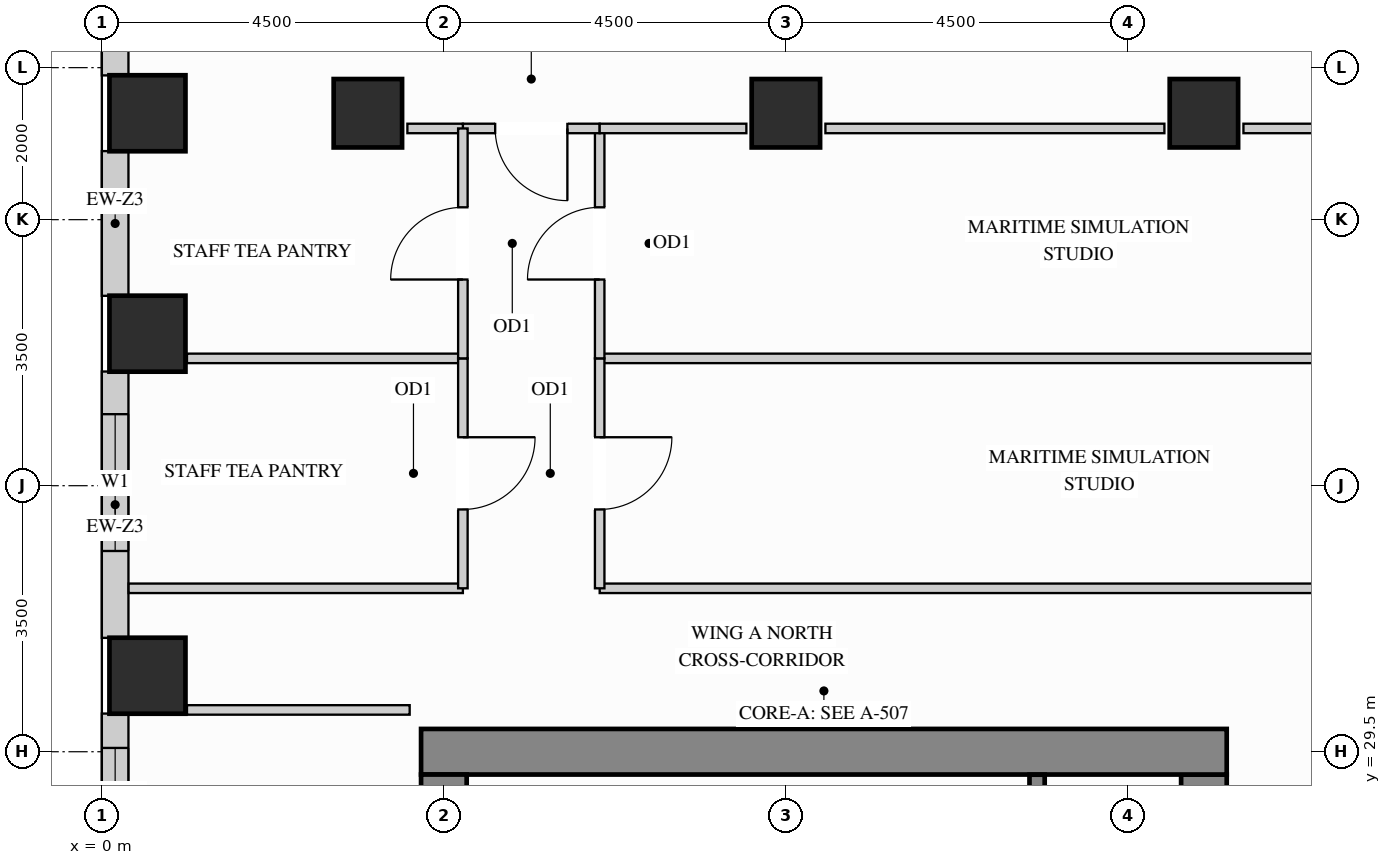
"""IFC4 building model, lengths in metres.
Left out: names, types, materials, properties, quantities, classifications, styles, units other than length and angle.
Written with IfcOpenShell. Run it as: python <this file> out.ifc"""

import sys

from ifc_helpers import new_model, si_unit, direction, frame, frame_2d, origin, origin_2d, place, context, subcontext, project, spatial, rectangle, extrude, source, transform, mapped, element, fill, save


model = new_model("IFC4")
c1 = context("Model", 3, precision=1e-05, world=origin(), true_north=direction((0.0, 1.0)))
c2 = subcontext(c1, "Body", "Model", "MODEL_VIEW")
j1 = project(units=[si_unit("LENGTHUNIT", "METRE"), si_unit("PLANEANGLEUNIT", "RADIAN")], contexts=[c1])
p1 = place(None, origin())
s1 = spatial("IfcSite", under=j1, at=p1, CompositionType="ELEMENT")
p2 = place(p1, origin())
s2 = spatial("IfcBuilding", under=s1, at=p2, CompositionType="ELEMENT")
p3 = place(p2, frame((0.0, 0.0, 143.1)))
s3 = spatial("IfcBuildingStorey", under=s2, at=p3, CompositionType="ELEMENT", Elevation=143.1)
m1 = source(origin(), c2, "Body", "SweptSolid", [
    extrude(rectangle(XDim=0.9, YDim=0.9, at=origin_2d()), origin(), (0.0, 0.0, 1.0), 3.4),
])
for number, where, z_axis, x_axis in (
    (1, (14.5, 37.9, 0.0), (0.0, 0.0, 1.0), (1.0, 0.0, 0.0)),
    (2, (3.5, 37.9, 0.0), (0.0, 0.0, 1.0), (1.0, 0.0, 0.0)),
    (3, (9.0, 37.9, 0.0), (0.0, 0.0, 1.0), (1.0, 0.0, 0.0)),
):
    element("IfcColumn", number, at=place(p3, frame(where, z_axis=z_axis, x_axis=x_axis)), inside=s3, PredefinedType="COLUMN", context=c2, shape_type="MappedRepresentation", body=[
        mapped(m1, transform((0.0, 0.0, 0.0), x_axis=(1.0, 0.0, 0.0), y_axis=(0.0, 1.0, 0.0), z_axis=(0.0, 0.0, 1.0))),
    ])
m2 = source(origin(), c2, "Body", "SweptSolid", [
    extrude(rectangle(XDim=1.0, YDim=1.0, at=origin_2d()), origin(), (0.0, 0.0, 1.0), 3.4),
])
for number, where, z_axis, x_axis in (
    (4, (0.6, 30.5, 0.0), (0.0, 0.0, 1.0), (1.0, 0.0, 0.0)),
    (5, (0.6, 35.0, 0.0), (0.0, 0.0, 1.0), (1.0, 0.0, 0.0)),
    (6, (0.6, 37.9, 0.0), (0.0, 0.0, 1.0), (1.0, 0.0, 0.0)),
):
    element("IfcColumn", number, at=place(p3, frame(where, z_axis=z_axis, x_axis=x_axis)), inside=s3, PredefinedType="COLUMN", context=c2, shape_type="MappedRepresentation", body=[
        mapped(m2, transform((0.0, 0.0, 0.0), x_axis=(1.0, 0.0, 0.0), y_axis=(0.0, 1.0, 0.0), z_axis=(0.0, 0.0, 1.0))),
    ])
m3 = source(origin(), c2, "Body", "SweptSolid", [
    extrude(rectangle(XDim=8.32, YDim=0.6, at=frame_2d((4.16, 0.0))), origin(), (0.0, 0.0, 1.0), 3.4),
])
p4 = place(p3, frame((14.5, 20.88, 0.0), z_axis=(0.0, 0.0, 1.0), x_axis=(0.0, 1.0, 0.0)))
e7 = element("IfcWall", 7, at=p4, inside=s3, PredefinedType="SHEAR", context=c2, shape_type="MappedRepresentation", body=[
    mapped(m3, transform((0.0, 0.0, 0.0), x_axis=(1.0, 0.0, 0.0), y_axis=(0.0, 1.0, 0.0), z_axis=(0.0, 0.0, 1.0))),
])
m4 = source(origin(), c2, "Body", "SweptSolid", [
    extrude(rectangle(XDim=10.6, YDim=0.6, at=frame_2d((5.3, 0.0))), origin(), (0.0, 0.0, 1.0), 3.4),
])
p5 = place(p3, frame((4.2, 29.5, 0.0), z_axis=(0.0, 0.0, 1.0), x_axis=(1.0, 0.0, 0.0)))
e8 = element("IfcWall", 8, at=p5, inside=s3, PredefinedType="SHEAR", context=c2, shape_type="MappedRepresentation", body=[
    mapped(m4, transform((0.0, 0.0, 0.0), x_axis=(1.0, 0.0, 0.0), y_axis=(0.0, 1.0, 0.0), z_axis=(0.0, 0.0, 1.0))),
])
m5 = source(origin(), c2, "Body", "SweptSolid", [
    extrude(rectangle(XDim=20.4, YDim=0.6, at=frame_2d((10.2, 0.0))), origin(), (0.0, 0.0, 1.0), 3.4),
])
p6 = place(p3, frame((4.5, 8.8, 0.0), z_axis=(0.0, 0.0, 1.0), x_axis=(0.0, 1.0, 0.0)))
e9 = element("IfcWall", 9, at=p6, inside=s3, PredefinedType="SHEAR", context=c2, shape_type="MappedRepresentation", body=[
    mapped(m5, transform((0.0, 0.0, 0.0), x_axis=(1.0, 0.0, 0.0), y_axis=(0.0, 1.0, 0.0), z_axis=(0.0, 0.0, 1.0))),
])
m6 = source(origin(), c2, "Body", "SweptSolid", [
    extrude(rectangle(XDim=0.754, YDim=0.35, at=frame_2d((0.377, 0.0))), origin(), (0.0, 0.0, 1.0), 3.385),
])
p7 = place(p3, frame((0.175, 39.152, 0.0), z_axis=(0.0, 0.0, 1.0), x_axis=(0.0, -1.0, 0.0)))
e10 = element("IfcWall", 10, at=p7, inside=s3, PredefinedType="SOLIDWALL", context=c2, shape_type="MappedRepresentation", body=[
    mapped(m6, transform((0.0, 0.0, 0.0), x_axis=(1.0, 0.0, 0.0), y_axis=(0.0, 1.0, 0.0), z_axis=(0.0, 0.0, 1.0))),
])
m7 = source(origin(), c2, "Body", "SweptSolid", [
    extrude(rectangle(XDim=1.904, YDim=0.35, at=frame_2d((0.952, 0.0))), origin(), (0.0, 0.0, 1.0), 2.612),
])
p8 = place(p3, frame((0.175, 37.402, 0.0), z_axis=(0.0, 0.0, 1.0), x_axis=(0.0, -1.0, 0.0)))
e11 = element("IfcWall", 11, at=p8, inside=s3, PredefinedType="SOLIDWALL", context=c2, shape_type="MappedRepresentation", body=[
    mapped(m7, transform((0.0, 0.0, 0.0), x_axis=(1.0, 0.0, 0.0), y_axis=(0.0, 1.0, 0.0), z_axis=(0.0, 0.0, 1.0))),
])
p9 = place(p3, frame((0.175, 34.502, 0.0), z_axis=(0.0, 0.0, 1.0), x_axis=(0.0, -1.0, 0.0)))
e12 = element("IfcWall", 12, at=p9, inside=s3, PredefinedType="SOLIDWALL", context=c2, shape_type="SweptSolid", body=[
    extrude(rectangle(XDim=3.504, YDim=0.35, at=frame_2d((1.752, 0.0))), origin(), (0.0, 0.0, 1.0), 2.612),
])
p10 = place(p9, frame((0.561, 0.0, 0.78)))
e13 = element("IfcOpeningElement", 13, at=p10, cuts=e12, PredefinedType="OPENING", context=c2, shape_type="SweptSolid", body=[
    extrude(rectangle(XDim=1.8, YDim=1.652, at=frame_2d((0.9, 0.826))), frame((0.0, 0.185, 0.0), z_axis=(0.0, -1.0, 0.0), x_axis=(1.0, 0.0, 0.0)), (0.0, 0.0, 1.0), 0.37),
])
p11 = place(p3, frame((0.175, 30.002, 0.0), z_axis=(0.0, 0.0, 1.0), x_axis=(0.0, -1.0, 0.0)))
e14 = element("IfcWall", 14, at=p11, inside=s3, PredefinedType="SOLIDWALL", context=c2, shape_type="SweptSolid", body=[
    extrude(rectangle(XDim=2.704, YDim=0.35, at=frame_2d((1.352, 0.0))), origin(), (0.0, 0.0, 1.0), 2.612),
])
p12 = place(p11, frame((0.452, 0.0, 0.78)))
e15 = element("IfcOpeningElement", 15, at=p12, cuts=e14, PredefinedType="OPENING", context=c2, shape_type="SweptSolid", body=[
    extrude(rectangle(XDim=1.8, YDim=1.652, at=frame_2d((0.9, 0.826))), frame((0.0, 0.185, 0.0), z_axis=(0.0, -1.0, 0.0), x_axis=(1.0, 0.0, 0.0)), (0.0, 0.0, 1.0), 0.37),
])
m8 = source(origin(), c2, "Body", "SweptSolid", [
    extrude(rectangle(XDim=11.93, YDim=0.125, at=frame_2d((5.965, 0.0))), origin(), (0.0, 0.0, 1.0), 3.385),
])
p13 = place(p3, frame((6.55, 34.675, 0.0), z_axis=(0.0, 0.0, 1.0), x_axis=(1.0, 0.0, 0.0)))
e16 = element("IfcWall", 16, at=p13, inside=s3, PredefinedType="PARTITIONING", context=c2, shape_type="MappedRepresentation", body=[
    mapped(m8, transform((0.0, 0.0, 0.0), x_axis=(1.0, 0.0, 0.0), y_axis=(0.0, 1.0, 0.0), z_axis=(0.0, 0.0, 1.0))),
])
m9 = source(origin(), c2, "Body", "SweptSolid", [
    extrude(rectangle(XDim=12.598, YDim=0.125, at=frame_2d((6.299, 0.0))), origin(), (0.0, 0.0, 1.0), 2.848),
])
p14 = place(p3, frame((6.55, 31.65, 0.0), z_axis=(0.0, 0.0, 1.0), x_axis=(1.0, 0.0, 0.0)))
e17 = element("IfcWall", 17, at=p14, inside=s3, PredefinedType="PARTITIONING", context=c2, shape_type="MappedRepresentation", body=[
    mapped(m9, transform((0.0, 0.0, 0.0), x_axis=(1.0, 0.0, 0.0), y_axis=(0.0, 1.0, 0.0), z_axis=(0.0, 0.0, 1.0))),
])
m10 = source(origin(), c2, "Body", "SweptSolid", [
    extrude(rectangle(XDim=4.398, YDim=0.125, at=frame_2d((2.199, 0.0))), origin(), (0.0, 0.0, 1.0), 2.848),
])
p15 = place(p3, frame((0.352, 31.65, 0.0), z_axis=(0.0, 0.0, 1.0), x_axis=(1.0, 0.0, 0.0)))
e18 = element("IfcWall", 18, at=p15, inside=s3, PredefinedType="PARTITIONING", context=c2, shape_type="MappedRepresentation", body=[
    mapped(m10, transform((0.0, 0.0, 0.0), x_axis=(1.0, 0.0, 0.0), y_axis=(0.0, 1.0, 0.0), z_axis=(0.0, 0.0, 1.0))),
])
m11 = source(origin(), c2, "Body", "SweptSolid", [
    extrude(rectangle(XDim=3.63, YDim=0.125, at=frame_2d((1.815, 0.0))), origin(), (0.0, 0.0, 1.0), 3.385),
])
p16 = place(p3, frame((1.12, 34.675, 0.0), z_axis=(0.0, 0.0, 1.0), x_axis=(1.0, 0.0, 0.0)))
e19 = element("IfcWall", 19, at=p16, inside=s3, PredefinedType="PARTITIONING", context=c2, shape_type="MappedRepresentation", body=[
    mapped(m11, transform((0.0, 0.0, 0.0), x_axis=(1.0, 0.0, 0.0), y_axis=(0.0, 1.0, 0.0), z_axis=(0.0, 0.0, 1.0))),
])
m12 = source(origin(), c2, "Body", "SweptSolid", [
    extrude(rectangle(XDim=2.93, YDim=0.125, at=frame_2d((1.465, 0.0))), origin(), (0.0, 0.0, 1.0), 3.385),
])
p17 = place(p3, frame((1.12, 30.05, 0.0), z_axis=(0.0, 0.0, 1.0), x_axis=(1.0, 0.0, 0.0)))
e20 = element("IfcWall", 20, at=p17, inside=s3, PredefinedType="PARTITIONING", context=c2, shape_type="MappedRepresentation", body=[
    mapped(m12, transform((0.0, 0.0, 0.0), x_axis=(1.0, 0.0, 0.0), y_axis=(0.0, 1.0, 0.0), z_axis=(0.0, 0.0, 1.0))),
])
p18 = place(p3, frame((6.55, 31.65, 0.0), z_axis=(0.0, 0.0, 1.0), x_axis=(0.0, 1.0, 0.0)))
e21 = element("IfcWall", 21, at=p18, inside=s3, PredefinedType="PARTITIONING", context=c2, shape_type="SweptSolid", body=[
    extrude(rectangle(XDim=3.025, YDim=0.125, at=frame_2d((1.513, 0.0))), origin(), (0.0, 0.0, 1.0), 3.385),
])
p19 = place(p18, frame((1.038, 0.0, 0.0)))
e22 = element("IfcOpeningElement", 22, at=p19, cuts=e21, PredefinedType="OPENING", context=c2, shape_type="SweptSolid", body=[
    extrude(rectangle(XDim=0.95, YDim=2.15, at=frame_2d((0.475, 1.075))), frame((0.0, 0.073, 0.0), z_axis=(0.0, -1.0, 0.0), x_axis=(1.0, 0.0, 0.0)), (0.0, 0.0, 1.0), 0.145),
])
p20 = place(p3, frame((6.55, 34.675, 0.0), z_axis=(0.0, 0.0, 1.0), x_axis=(0.0, 1.0, 0.0)))
e23 = element("IfcWall", 23, at=p20, inside=s3, PredefinedType="PARTITIONING", context=c2, shape_type="SweptSolid", body=[
    extrude(rectangle(XDim=3.025, YDim=0.125, at=frame_2d((1.512, 0.0))), origin(), (0.0, 0.0, 1.0), 3.385),
])
p21 = place(p20, frame((1.038, 0.0, 0.0)))
e24 = element("IfcOpeningElement", 24, at=p21, cuts=e23, PredefinedType="OPENING", context=c2, shape_type="SweptSolid", body=[
    extrude(rectangle(XDim=0.95, YDim=2.15, at=frame_2d((0.475, 1.075))), frame((0.0, 0.073, 0.0), z_axis=(0.0, -1.0, 0.0), x_axis=(1.0, 0.0, 0.0)), (0.0, 0.0, 1.0), 0.145),
])
p22 = place(p3, frame((4.75, 37.7, 0.0), z_axis=(0.0, 0.0, 1.0), x_axis=(1.0, 0.0, 0.0)))
e25 = element("IfcWall", 25, at=p22, inside=s3, PredefinedType="PARTITIONING", context=c2, shape_type="SweptSolid", body=[
    extrude(rectangle(XDim=1.8, YDim=0.125, at=frame_2d((0.9, 0.0))), origin(), (0.0, 0.0, 1.0), 2.773),
])
p23 = place(p22, frame((0.425, 0.0, 0.0)))
e26 = element("IfcOpeningElement", 26, at=p23, cuts=e25, PredefinedType="OPENING", context=c2, shape_type="SweptSolid", body=[
    extrude(rectangle(XDim=0.95, YDim=2.15, at=frame_2d((0.475, 1.075))), frame((0.0, 0.073, 0.0), z_axis=(0.0, -1.0, 0.0), x_axis=(1.0, 0.0, 0.0)), (0.0, 0.0, 1.0), 0.145),
])
m13 = source(origin(), c2, "Body", "SweptSolid", [
    extrude(rectangle(XDim=1.93, YDim=0.125, at=frame_2d((0.965, 0.0))), origin(), (0.0, 0.0, 1.0), 2.773),
])
p24 = place(p3, frame((6.55, 37.7, 0.0), z_axis=(0.0, 0.0, 1.0), x_axis=(1.0, 0.0, 0.0)))
e27 = element("IfcWall", 27, at=p24, inside=s3, PredefinedType="PARTITIONING", context=c2, shape_type="MappedRepresentation", body=[
    mapped(m13, transform((0.0, 0.0, 0.0), x_axis=(1.0, 0.0, 0.0), y_axis=(0.0, 1.0, 0.0), z_axis=(0.0, 0.0, 1.0))),
])
m14 = source(origin(), c2, "Body", "SweptSolid", [
    extrude(rectangle(XDim=4.46, YDim=0.125, at=frame_2d((2.23, 0.0))), origin(), (0.0, 0.0, 1.0), 2.773),
])
p25 = place(p3, frame((9.52, 37.7, 0.0), z_axis=(0.0, 0.0, 1.0), x_axis=(1.0, 0.0, 0.0)))
e28 = element("IfcWall", 28, at=p25, inside=s3, PredefinedType="PARTITIONING", context=c2, shape_type="MappedRepresentation", body=[
    mapped(m14, transform((0.0, 0.0, 0.0), x_axis=(1.0, 0.0, 0.0), y_axis=(0.0, 1.0, 0.0), z_axis=(0.0, 0.0, 1.0))),
])
m15 = source(origin(), c2, "Body", "SweptSolid", [
    extrude(rectangle(XDim=1.88, YDim=0.125, at=frame_2d((0.94, 0.0))), origin(), (0.0, 0.0, 1.0), 2.773),
])
p26 = place(p3, frame((15.02, 37.7, 0.0), z_axis=(0.0, 0.0, 1.0), x_axis=(1.0, 0.0, 0.0)))
e29 = element("IfcWall", 29, at=p26, inside=s3, PredefinedType="PARTITIONING", context=c2, shape_type="MappedRepresentation", body=[
    mapped(m15, transform((0.0, 0.0, 0.0), x_axis=(1.0, 0.0, 0.0), y_axis=(0.0, 1.0, 0.0), z_axis=(0.0, 0.0, 1.0))),
])
m16 = source(origin(), c2, "Body", "SweptSolid", [
    extrude(rectangle(XDim=0.73, YDim=0.125, at=frame_2d((0.365, 0.0))), origin(), (0.0, 0.0, 1.0), 2.773),
])
p27 = place(p3, frame((4.02, 37.7, 0.0), z_axis=(0.0, 0.0, 1.0), x_axis=(1.0, 0.0, 0.0)))
e30 = element("IfcWall", 30, at=p27, inside=s3, PredefinedType="PARTITIONING", context=c2, shape_type="MappedRepresentation", body=[
    mapped(m16, transform((0.0, 0.0, 0.0), x_axis=(1.0, 0.0, 0.0), y_axis=(0.0, 1.0, 0.0), z_axis=(0.0, 0.0, 1.0))),
])
p28 = place(p3, frame((4.75, 31.65, 0.0), z_axis=(0.0, 0.0, 1.0), x_axis=(0.0, 1.0, 0.0)))
e31 = element("IfcWall", 31, at=p28, inside=s3, PredefinedType="PARTITIONING", context=c2, shape_type="SweptSolid", body=[
    extrude(rectangle(XDim=3.025, YDim=0.125, at=frame_2d((1.513, 0.0))), origin(), (0.0, 0.0, 1.0), 3.385),
])
p29 = place(p28, frame((1.038, 0.0, 0.0)))
e32 = element("IfcOpeningElement", 32, at=p29, cuts=e31, PredefinedType="OPENING", context=c2, shape_type="SweptSolid", body=[
    extrude(rectangle(XDim=0.95, YDim=2.15, at=frame_2d((0.475, 1.075))), frame((0.0, 0.073, 0.0), z_axis=(0.0, -1.0, 0.0), x_axis=(1.0, 0.0, 0.0)), (0.0, 0.0, 1.0), 0.145),
])
p30 = place(p3, frame((4.75, 34.675, 0.0), z_axis=(0.0, 0.0, 1.0), x_axis=(0.0, 1.0, 0.0)))
e33 = element("IfcWall", 33, at=p30, inside=s3, PredefinedType="PARTITIONING", context=c2, shape_type="SweptSolid", body=[
    extrude(rectangle(XDim=3.025, YDim=0.125, at=frame_2d((1.512, 0.0))), origin(), (0.0, 0.0, 1.0), 3.385),
])
p31 = place(p30, frame((1.038, 0.0, 0.0)))
e34 = element("IfcOpeningElement", 34, at=p31, cuts=e33, PredefinedType="OPENING", context=c2, shape_type="SweptSolid", body=[
    extrude(rectangle(XDim=0.95, YDim=2.15, at=frame_2d((0.475, 1.075))), frame((0.0, 0.073, 0.0), z_axis=(0.0, -1.0, 0.0), x_axis=(1.0, 0.0, 0.0)), (0.0, 0.0, 1.0), 0.145),
])
m17 = source(origin(), c2, "Body", "SweptSolid", [
    extrude(rectangle(XDim=3.753, YDim=0.2, at=frame_2d((1.876, 0.0))), origin(), (0.0, 0.0, 1.0), 3.4),
])
p32 = place(p3, frame((12.305, 25.445, 0.0), z_axis=(0.0, 0.0, 1.0), x_axis=(0.0, 1.0, 0.0)))
e35 = element("IfcWall", 35, at=p32, inside=s3, PredefinedType="SHEAR", context=c2, shape_type="MappedRepresentation", body=[
    mapped(m17, transform((0.0, 0.0, 0.0), x_axis=(1.0, 0.0, 0.0), y_axis=(0.0, 1.0, 0.0), z_axis=(0.0, 0.0, 1.0))),
])
m18 = source(origin(), c2, "Body", "SweptSolid", [
    extrude(rectangle(XDim=0.95, YDim=2.15, at=frame_2d((0.475, 1.075))), frame((0.0, 0.025, 0.0), z_axis=(0.0, -1.0, 0.0), x_axis=(1.0, 0.0, 0.0)), (0.0, 0.0, 1.0), 0.05),
])
p33 = place(p19, origin())
e36 = element("IfcDoor", 36, at=p33, inside=s3, OperationType="SINGLE_SWING_RIGHT", PredefinedType="DOOR", context=c2, shape_type="MappedRepresentation", body=[
    mapped(m18, transform((0.0, 0.0, 0.0), x_axis=(1.0, 0.0, 0.0), y_axis=(0.0, 1.0, 0.0), z_axis=(0.0, 0.0, 1.0))),
])
fill(e22, e36)
p34 = place(p21, origin())
e37 = element("IfcDoor", 37, at=p34, inside=s3, OperationType="SINGLE_SWING_LEFT", PredefinedType="DOOR", context=c2, shape_type="MappedRepresentation", body=[
    mapped(m18, transform((0.0, 0.0, 0.0), x_axis=(1.0, 0.0, 0.0), y_axis=(0.0, 1.0, 0.0), z_axis=(0.0, 0.0, 1.0))),
])
fill(e24, e37)
p35 = place(p23, origin())
e38 = element("IfcDoor", 38, at=p35, inside=s3, OperationType="SINGLE_SWING_RIGHT", PredefinedType="DOOR", context=c2, shape_type="MappedRepresentation", body=[
    mapped(m18, transform((0.0, 0.0, 0.0), x_axis=(1.0, 0.0, 0.0), y_axis=(0.0, 1.0, 0.0), z_axis=(0.0, 0.0, 1.0))),
])
fill(e26, e38)
p36 = place(p29, origin())
e39 = element("IfcDoor", 39, at=p36, inside=s3, OperationType="SINGLE_SWING_RIGHT", PredefinedType="DOOR", context=c2, shape_type="MappedRepresentation", body=[
    mapped(m18, transform((0.0, 0.0, 0.0), x_axis=(1.0, 0.0, 0.0), y_axis=(0.0, 1.0, 0.0), z_axis=(0.0, 0.0, 1.0))),
])
fill(e32, e39)
p37 = place(p31, origin())
e40 = element("IfcDoor", 40, at=p37, inside=s3, OperationType="SINGLE_SWING_LEFT", PredefinedType="DOOR", context=c2, shape_type="MappedRepresentation", body=[
    mapped(m18, transform((0.0, 0.0, 0.0), x_axis=(1.0, 0.0, 0.0), y_axis=(0.0, 1.0, 0.0), z_axis=(0.0, 0.0, 1.0))),
])
fill(e34, e40)
m19 = source(origin(), c2, "Body", "SweptSolid", [
    extrude(rectangle(XDim=1.8, YDim=1.652, at=frame_2d((0.9, 0.826))), frame((0.0, 0.03, 0.0), z_axis=(0.0, -1.0, 0.0), x_axis=(1.0, 0.0, 0.0)), (0.0, 0.0, 1.0), 0.06),
])
p38 = place(p10, origin())
e41 = element("IfcWindow", 41, at=p38, inside=s3, PartitioningType="SINGLE_PANEL", PredefinedType="WINDOW", context=c2, shape_type="MappedRepresentation", body=[
    mapped(m19, transform((0.0, 0.0, 0.0), x_axis=(1.0, 0.0, 0.0), y_axis=(0.0, 1.0, 0.0), z_axis=(0.0, 0.0, 1.0))),
])
fill(e13, e41)
p39 = place(p12, origin())
e42 = element("IfcWindow", 42, at=p39, inside=s3, PartitioningType="SINGLE_PANEL", PredefinedType="WINDOW", context=c2, shape_type="MappedRepresentation", body=[
    mapped(m19, transform((0.0, 0.0, 0.0), x_axis=(1.0, 0.0, 0.0), y_axis=(0.0, 1.0, 0.0), z_axis=(0.0, 0.0, 1.0))),
])
fill(e15, e42)
save(model, sys.argv[1])
